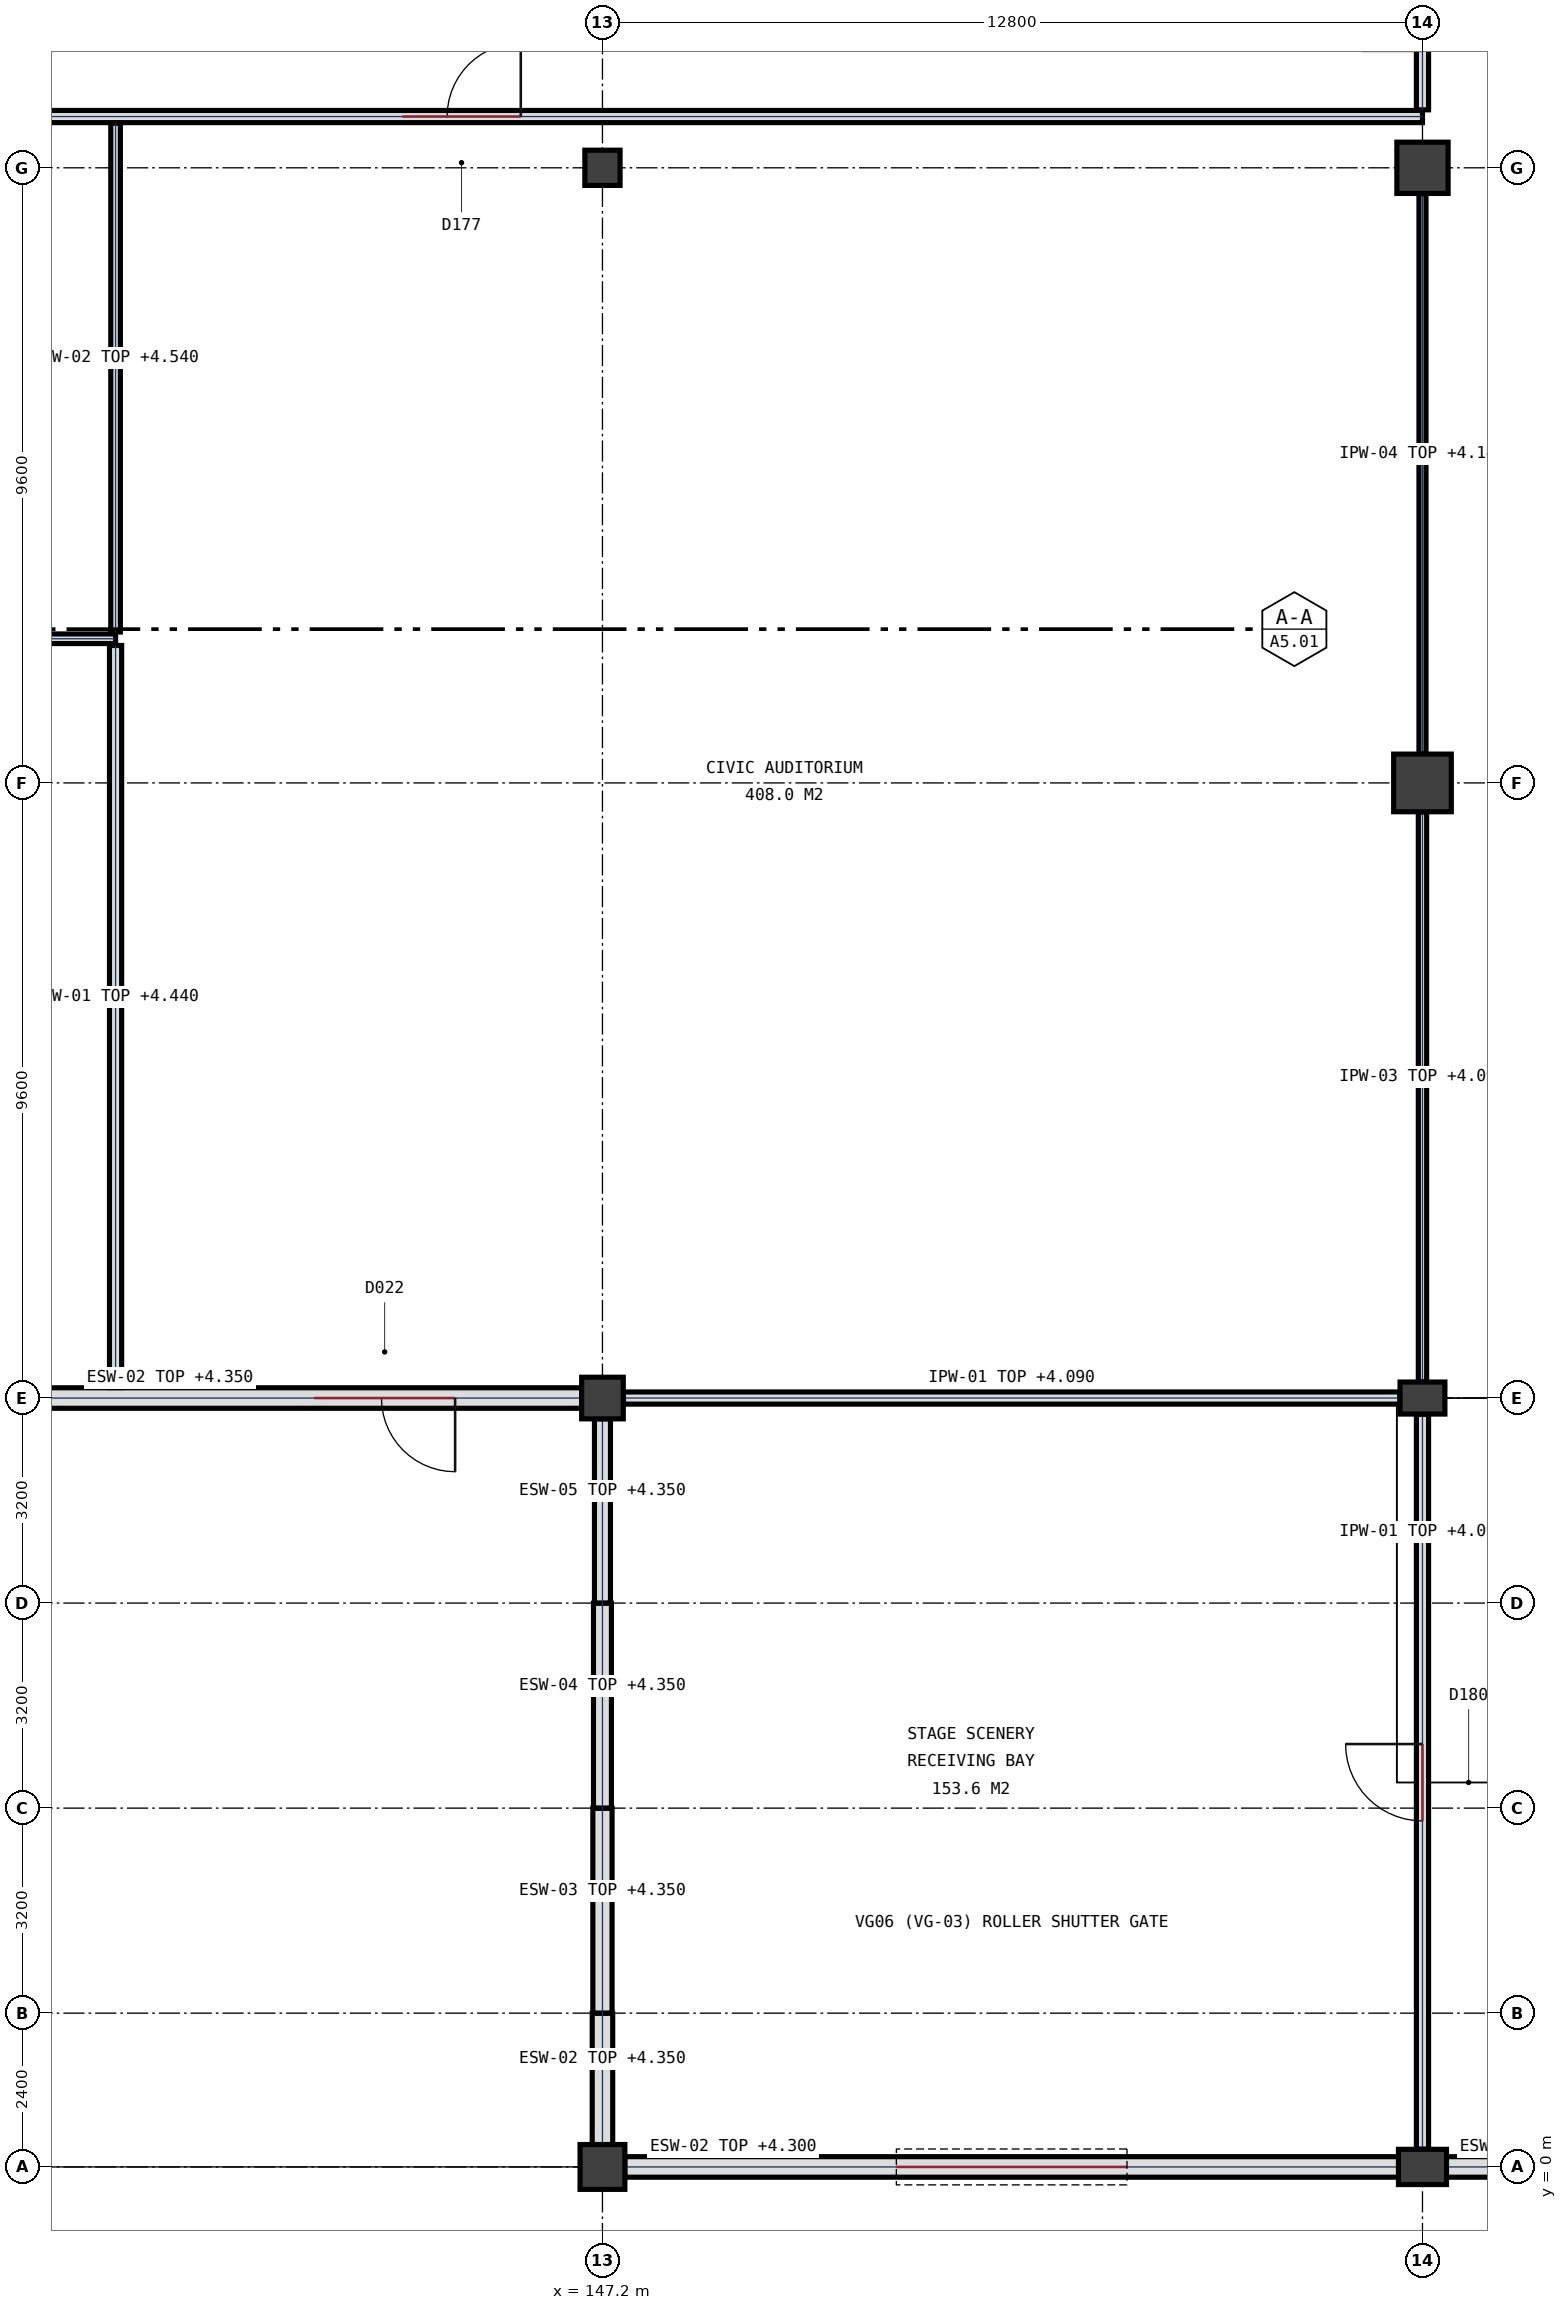
"""IFC4 building model, lengths in metres.
Left out: names, types, materials, properties, quantities, classifications, styles, units other than length and angle.
Written with IfcOpenShell. Run it as: python <this file> out.ifc"""

import sys

from ifc_helpers import new_model, si_unit, direction, frame, frame_2d, origin, origin_2d, place, context, subcontext, project, spatial, rectangle, circle, extrude, element, fill, save


model = new_model("IFC4")
c1 = context("Model", 3, precision=1e-05, world=origin(), true_north=direction((0.0, 1.0)))
c2 = subcontext(c1, "Body", "Model", "MODEL_VIEW")
j1 = project(units=[si_unit("LENGTHUNIT", "METRE"), si_unit("PLANEANGLEUNIT", "RADIAN")], contexts=[c1])
p1 = place(None, origin())
s1 = spatial("IfcSite", under=j1, at=p1, CompositionType="ELEMENT")
p2 = place(p1, origin())
s2 = spatial("IfcBuilding", under=s1, at=p2, CompositionType="ELEMENT")
p3 = place(p2, origin())
s3 = spatial("IfcBuildingStorey", under=s2, at=p3, CompositionType="ELEMENT", Elevation=0.0)
p4 = place(p3, frame((147.2, 0.0, 0.0), z_axis=(0.0, 0.0, 1.0), x_axis=(1.0, 0.0, 0.0)))
e1 = element("IfcColumn", 1, at=p4, inside=s3, PredefinedType="COLUMN", context=c2, shape_type="SweptSolid", body=[
    extrude(rectangle(XDim=0.7, YDim=0.7, at=origin_2d()), origin(), (0.0, 0.0, 1.0), 5.4),
])
p5 = place(p3, frame((147.2, 12.0, 0.0), z_axis=(0.0, 0.0, 1.0), x_axis=(1.0, 0.0, 0.0)))
e2 = element("IfcColumn", 2, at=p5, inside=s3, PredefinedType="COLUMN", context=c2, shape_type="SweptSolid", body=[
    extrude(rectangle(XDim=0.65, YDim=0.65, at=origin_2d()), origin(), (0.0, 0.0, 1.0), 5.4),
])
p6 = place(p3, frame((147.2, 31.2, 0.0), z_axis=(0.0, 0.0, 1.0), x_axis=(1.0, 0.0, 0.0)))
e3 = element("IfcColumn", 3, at=p6, inside=s3, PredefinedType="COLUMN", context=c2, shape_type="SweptSolid", body=[
    extrude(rectangle(XDim=0.55, YDim=0.55, at=origin_2d()), origin(), (0.0, 0.0, 1.0), 5.4),
])
p7 = place(p3, frame((160.0, 0.0, 0.0), z_axis=(0.0, 0.0, 1.0), x_axis=(1.0, 0.0, 0.0)))
e4 = element("IfcColumn", 4, at=p7, inside=s3, PredefinedType="COLUMN", context=c2, shape_type="SweptSolid", body=[
    extrude(rectangle(XDim=0.75, YDim=0.55, at=origin_2d()), origin(), (0.0, 0.0, 1.0), 5.4),
])
p8 = place(p3, frame((160.0, 12.0, 0.0), z_axis=(0.0, 0.0, 1.0), x_axis=(1.0, 0.0, 0.0)))
e5 = element("IfcColumn", 5, at=p8, inside=s3, PredefinedType="COLUMN", context=c2, shape_type="SweptSolid", body=[
    extrude(rectangle(XDim=0.7, YDim=0.5, at=origin_2d()), origin(), (0.0, 0.0, 1.0), 5.4),
])
p9 = place(p3, frame((160.0, 21.6, 0.0), z_axis=(0.0, 0.0, 1.0), x_axis=(1.0, 0.0, 0.0)))
e6 = element("IfcColumn", 6, at=p9, inside=s3, PredefinedType="COLUMN", context=c2, shape_type="SweptSolid", body=[
    extrude(circle(Radius=0.45, at=origin_2d()), origin(), (0.0, 0.0, 1.0), 5.4),
])
p10 = place(p3, frame((160.0, 31.2, 0.0), z_axis=(0.0, 0.0, 1.0), x_axis=(1.0, 0.0, 0.0)))
e7 = element("IfcColumn", 7, at=p10, inside=s3, PredefinedType="COLUMN", context=c2, shape_type="SweptSolid", body=[
    extrude(circle(Radius=0.4, at=origin_2d()), origin(), (0.0, 0.0, 1.0), 5.4),
])
p11 = place(p3, frame((171.702, 0.0, 0.0), z_axis=(0.0, 0.0, 1.0), x_axis=(-1.0, 0.0, 0.0)))
e8 = element("IfcWall", 8, at=p11, inside=s3, PredefinedType="SOLIDWALL", context=c2, shape_type="SweptSolid", body=[
    extrude(rectangle(XDim=11.329, YDim=0.32, at=frame_2d((5.665, 0.0))), origin(), (0.0, 0.0, 1.0), 4.25),
])
p12 = place(p11, frame((3.865, 0.0, 0.0)))
e9 = element("IfcOpeningElement", 9, at=p12, cuts=e8, PredefinedType="OPENING", context=c2, shape_type="SweptSolid", body=[
    extrude(rectangle(XDim=3.6, YDim=3.05, at=frame_2d((1.8, 1.525))), frame((0.0, 0.17, 0.0), z_axis=(0.0, -1.0, 0.0), x_axis=(1.0, 0.0, 0.0)), (0.0, 0.0, 1.0), 0.34),
])
p13 = place(p3, frame((159.627, 0.0, 0.0), z_axis=(0.0, 0.0, 1.0), x_axis=(-1.0, 0.0, 0.0)))
e10 = element("IfcWall", 10, at=p13, inside=s3, PredefinedType="SOLIDWALL", context=c2, shape_type="SweptSolid", body=[
    extrude(rectangle(XDim=12.079, YDim=0.32, at=frame_2d((6.04, 0.0))), origin(), (0.0, 0.0, 1.0), 4.3),
])
p14 = place(p13, frame((4.24, 0.0, 0.0)))
e11 = element("IfcOpeningElement", 11, at=p14, cuts=e10, PredefinedType="OPENING", context=c2, shape_type="SweptSolid", body=[
    extrude(rectangle(XDim=3.6, YDim=3.05, at=frame_2d((1.8, 1.525))), frame((0.0, 0.17, 0.0), z_axis=(0.0, -1.0, 0.0), x_axis=(1.0, 0.0, 0.0)), (0.0, 0.0, 1.0), 0.34),
])
p15 = place(p3, frame((147.2, 0.348, 0.0), z_axis=(0.0, 0.0, 1.0), x_axis=(0.0, 1.0, 0.0)))
e12 = element("IfcWall", 12, at=p15, inside=s3, PredefinedType="SOLIDWALL", context=c2, shape_type="SweptSolid", body=[
    extrude(rectangle(XDim=2.05, YDim=0.32, at=frame_2d((1.025, 0.0))), origin(), (0.0, 0.0, 1.0), 4.35),
])
p16 = place(p3, frame((147.2, 2.402, 0.0), z_axis=(0.0, 0.0, 1.0), x_axis=(0.0, 1.0, 0.0)))
e13 = element("IfcWall", 13, at=p16, inside=s3, PredefinedType="SOLIDWALL", context=c2, shape_type="SweptSolid", body=[
    extrude(rectangle(XDim=3.196, YDim=0.3, at=frame_2d((1.598, 0.0))), origin(), (0.0, 0.0, 1.0), 4.35),
])
p17 = place(p3, frame((147.2, 5.602, 0.0), z_axis=(0.0, 0.0, 1.0), x_axis=(0.0, 1.0, 0.0)))
e14 = element("IfcWall", 14, at=p17, inside=s3, PredefinedType="SOLIDWALL", context=c2, shape_type="SweptSolid", body=[
    extrude(rectangle(XDim=3.196, YDim=0.28, at=frame_2d((1.598, 0.0))), origin(), (0.0, 0.0, 1.0), 4.35),
])
p18 = place(p3, frame((147.2, 8.802, 0.0), z_axis=(0.0, 0.0, 1.0), x_axis=(0.0, 1.0, 0.0)))
e15 = element("IfcWall", 15, at=p18, inside=s3, PredefinedType="SOLIDWALL", context=c2, shape_type="SweptSolid", body=[
    extrude(rectangle(XDim=2.875, YDim=0.25, at=frame_2d((1.438, 0.0))), origin(), (0.0, 0.0, 1.0), 4.35),
])
p19 = place(p3, frame((146.877, 12.0, 0.0), z_axis=(0.0, 0.0, 1.0), x_axis=(-1.0, 0.0, 0.0)))
e16 = element("IfcWall", 16, at=p19, inside=s3, PredefinedType="SOLIDWALL", context=c2, shape_type="SweptSolid", body=[
    extrude(rectangle(XDim=12.029, YDim=0.32, at=frame_2d((6.015, 0.0))), origin(), (0.0, 0.0, 1.0), 4.35),
])
p20 = place(p19, frame((8.677, 0.0, 0.0)))
e17 = element("IfcOpeningElement", 17, at=p20, cuts=e16, PredefinedType="OPENING", context=c2, shape_type="SweptSolid", body=[
    extrude(rectangle(XDim=2.0, YDim=2.35, at=frame_2d((1.0, 1.175))), frame((0.0, 0.17, 0.0), z_axis=(0.0, -1.0, 0.0), x_axis=(1.0, 0.0, 0.0)), (0.0, 0.0, 1.0), 0.34),
])
p21 = place(p19, frame((1.977, 0.0, 0.0)))
e18 = element("IfcOpeningElement", 18, at=p21, cuts=e16, PredefinedType="OPENING", context=c2, shape_type="SweptSolid", body=[
    extrude(rectangle(XDim=2.2, YDim=2.45, at=frame_2d((1.1, 1.225))), frame((0.0, 0.17, 0.0), z_axis=(0.0, -1.0, 0.0), x_axis=(1.0, 0.0, 0.0)), (0.0, 0.0, 1.0), 0.34),
])
p22 = place(p3, frame((147.528, 12.0, 0.0), z_axis=(0.0, 0.0, 1.0), x_axis=(1.0, 0.0, 0.0)))
e19 = element("IfcWall", 19, at=p22, inside=s3, PredefinedType="PARTITIONING", context=c2, shape_type="SweptSolid", body=[
    extrude(rectangle(XDim=12.119, YDim=0.19, at=frame_2d((6.06, 0.0))), origin(), (0.0, 0.0, 1.0), 4.09),
])
p23 = place(p3, frame((160.0, 0.278, 0.0), z_axis=(0.0, 0.0, 1.0), x_axis=(0.0, 1.0, 0.0)))
e20 = element("IfcWall", 20, at=p23, inside=s3, PredefinedType="PARTITIONING", context=c2, shape_type="SweptSolid", body=[
    extrude(rectangle(XDim=11.469, YDim=0.19, at=frame_2d((5.734, 0.0))), origin(), (0.0, 0.0, 1.0), 4.09),
])
p24 = place(p23, frame((5.122, 0.0, 0.0)))
e21 = element("IfcOpeningElement", 21, at=p24, cuts=e20, PredefinedType="OPENING", context=c2, shape_type="SweptSolid", body=[
    extrude(rectangle(XDim=1.2, YDim=2.2, at=frame_2d((0.6, 1.1))), frame((0.0, 0.105, 0.0), z_axis=(0.0, -1.0, 0.0), x_axis=(1.0, 0.0, 0.0)), (0.0, 0.0, 1.0), 0.21),
])
p25 = place(p3, frame((129.5, 32.0, 0.0), z_axis=(0.0, 0.0, 1.0), x_axis=(1.0, 0.0, 0.0)))
e22 = element("IfcWall", 22, at=p25, inside=s3, PredefinedType="PARTITIONING", context=c2, shape_type="SweptSolid", body=[
    extrude(rectangle(XDim=30.5, YDim=0.19, at=frame_2d((15.25, 0.0))), origin(), (0.0, 0.0, 1.0), 4.14),
])
p26 = place(p25, frame((14.575, 0.0, 0.0)))
e23 = element("IfcOpeningElement", 23, at=p26, cuts=e22, PredefinedType="OPENING", context=c2, shape_type="SweptSolid", body=[
    extrude(rectangle(XDim=1.85, YDim=2.35, at=frame_2d((0.925, 1.175))), frame((0.0, 0.105, 0.0), z_axis=(0.0, -1.0, 0.0), x_axis=(1.0, 0.0, 0.0)), (0.0, 0.0, 1.0), 0.21),
])
p27 = place(p3, frame((129.58, 23.85, 0.0), z_axis=(0.0, 0.0, 1.0), x_axis=(1.0, 0.0, 0.0)))
e24 = element("IfcWall", 24, at=p27, inside=s3, PredefinedType="PARTITIONING", context=c2, shape_type="SweptSolid", body=[
    extrude(rectangle(XDim=10.02, YDim=0.15, at=frame_2d((5.01, 0.0))), origin(), (0.0, 0.0, 1.0), 4.49),
])
p28 = place(p3, frame((139.6, 12.163, 0.0), z_axis=(0.0, 0.0, 1.0), x_axis=(0.0, 1.0, 0.0)))
e25 = element("IfcWall", 25, at=p28, inside=s3, PredefinedType="PARTITIONING", context=c2, shape_type="SweptSolid", body=[
    extrude(rectangle(XDim=11.582, YDim=0.19, at=frame_2d((5.791, 0.0))), origin(), (0.0, 0.0, 1.0), 4.44),
])
p29 = place(p3, frame((139.6, 23.955, 0.0), z_axis=(0.0, 0.0, 1.0), x_axis=(0.0, 1.0, 0.0)))
e26 = element("IfcWall", 26, at=p29, inside=s3, PredefinedType="PARTITIONING", context=c2, shape_type="SweptSolid", body=[
    extrude(rectangle(XDim=7.94, YDim=0.15, at=frame_2d((3.97, 0.0))), origin(), (0.0, 0.0, 1.0), 4.54),
])
p30 = place(p3, frame((160.0, 12.253, 0.0), z_axis=(0.0, 0.0, 1.0), x_axis=(0.0, 1.0, 0.0)))
e27 = element("IfcWall", 27, at=p30, inside=s3, PredefinedType="PARTITIONING", context=c2, shape_type="SweptSolid", body=[
    extrude(rectangle(XDim=8.894, YDim=0.13, at=frame_2d((4.447, 0.0))), origin(), (0.0, 0.0, 1.0), 4.09),
])
p31 = place(p3, frame((160.0, 22.053, 0.0), z_axis=(0.0, 0.0, 1.0), x_axis=(0.0, 1.0, 0.0)))
e28 = element("IfcWall", 28, at=p31, inside=s3, PredefinedType="PARTITIONING", context=c2, shape_type="SweptSolid", body=[
    extrude(rectangle(XDim=8.744, YDim=0.11, at=frame_2d((4.372, 0.0))), origin(), (0.0, 0.0, 1.0), 4.14),
])
p32 = place(p3, frame((160.0, 32.105, 0.0), z_axis=(0.0, 0.0, 1.0), x_axis=(0.0, 1.0, 0.0)))
e29 = element("IfcWall", 29, at=p32, inside=s3, PredefinedType="PARTITIONING", context=c2, shape_type="SweptSolid", body=[
    extrude(rectangle(XDim=2.79, YDim=0.19, at=frame_2d((1.395, 0.0))), origin(), (0.0, 0.0, 1.0), 4.14),
])
p33 = place(p32, frame((0.92, 0.0, 0.0)))
e30 = element("IfcOpeningElement", 30, at=p33, cuts=e29, PredefinedType="OPENING", context=c2, shape_type="SweptSolid", body=[
    extrude(rectangle(XDim=0.95, YDim=2.15, at=frame_2d((0.475, 1.075))), frame((0.0, 0.105, 0.0), z_axis=(0.0, -1.0, 0.0), x_axis=(1.0, 0.0, 0.0)), (0.0, 0.0, 1.0), 0.21),
])
p34 = place(p14, origin())
e31 = element("IfcDoor", 31, at=p34, inside=s3, OperationType="ROLLINGUP", PredefinedType="GATE", context=c2, shape_type="SweptSolid", body=[
    extrude(rectangle(XDim=3.6, YDim=3.05, at=frame_2d((1.8, 1.525))), frame((0.0, 0.032, 0.0), z_axis=(0.0, -1.0, 0.0), x_axis=(1.0, 0.0, 0.0)), (0.0, 0.0, 1.0), 0.065),
])
fill(e11, e31)
p35 = place(p21, origin())
e32 = element("IfcDoor", 32, at=p35, inside=s3, OperationType="SINGLE_SWING_LEFT", PredefinedType="DOOR", context=c2, shape_type="SweptSolid", body=[
    extrude(rectangle(XDim=2.2, YDim=2.45, at=frame_2d((1.1, 1.225))), frame((0.0, 0.032, 0.0), z_axis=(0.0, -1.0, 0.0), x_axis=(1.0, 0.0, 0.0)), (0.0, 0.0, 1.0), 0.065),
])
fill(e18, e32)
p36 = place(p26, origin())
e33 = element("IfcDoor", 33, at=p36, inside=s3, OperationType="SINGLE_SWING_RIGHT", PredefinedType="DOOR", context=c2, shape_type="SweptSolid", body=[
    extrude(rectangle(XDim=1.85, YDim=2.35, at=frame_2d((0.925, 1.175))), frame((0.0, 0.032, 0.0), z_axis=(0.0, -1.0, 0.0), x_axis=(1.0, 0.0, 0.0)), (0.0, 0.0, 1.0), 0.065),
])
fill(e23, e33)
p37 = place(p24, origin())
e34 = element("IfcDoor", 34, at=p37, inside=s3, OperationType="SINGLE_SWING_RIGHT", PredefinedType="DOOR", context=c2, shape_type="SweptSolid", body=[
    extrude(rectangle(XDim=1.2, YDim=2.2, at=frame_2d((0.6, 1.1))), frame((0.0, 0.032, 0.0), z_axis=(0.0, -1.0, 0.0), x_axis=(1.0, 0.0, 0.0)), (0.0, 0.0, 1.0), 0.065),
])
fill(e21, e34)
save(model, sys.argv[1])
